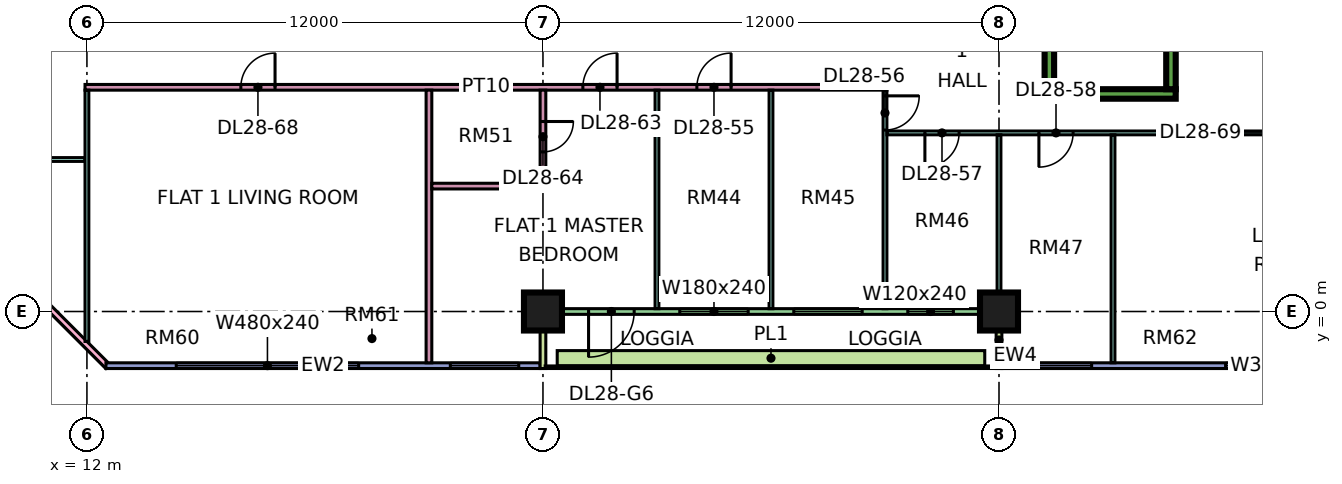
"""IFC4 building model, lengths in metres.
Left out: names, types, materials, properties, quantities, classifications, styles, units other than length and angle.
Written with IfcOpenShell. Run it as: python <this file> out.ifc"""

import sys

from ifc_helpers import new_model, si_unit, direction, frame, frame_2d, origin, origin_2d, place, context, subcontext, project, spatial, rectangle, extrude, element, fill, save


model = new_model("IFC4")
c1 = context("Model", 3, precision=1e-05, world=origin(), true_north=direction((0.0, 1.0)))
c2 = subcontext(c1, "Body", "Model", "MODEL_VIEW")
j1 = project(units=[si_unit("LENGTHUNIT", "METRE"), si_unit("PLANEANGLEUNIT", "RADIAN")], contexts=[c1])
p1 = place(None, origin())
s1 = spatial("IfcSite", under=j1, at=p1, CompositionType="ELEMENT")
p2 = place(p1, origin())
s2 = spatial("IfcBuilding", under=s1, at=p2, CompositionType="ELEMENT")
p3 = place(p2, frame((0.0, 0.0, 121.9)))
s3 = spatial("IfcBuildingStorey", under=s2, at=p3, CompositionType="ELEMENT", Elevation=121.9)
for number, where, z_axis, x_axis in (
    (1, (24.0, 0.0, 0.0), (0.0, 0.0, 1.0), (1.0, 0.0, 0.0)),
    (2, (36.0, 0.0, 0.0), (0.0, 0.0, 1.0), (1.0, 0.0, 0.0)),
):
    element("IfcColumn", number, at=place(p3, frame(where, z_axis=z_axis, x_axis=x_axis)), inside=s3, PredefinedType="COLUMN", context=c2, shape_type="SweptSolid", body=[
        extrude(rectangle(XDim=1.0, YDim=1.0, at=origin_2d()), origin(), (0.0, 0.0, 1.0), 3.75),
    ])
p4 = place(p3, frame((37.2, 5.725, 0.0), z_axis=(0.0, 0.0, 1.0), x_axis=(1.0, 0.0, 0.0)))
e3 = element("IfcWall", 3, at=p4, inside=s3, PredefinedType="SHEAR", context=c2, shape_type="SweptSolid", body=[
    extrude(rectangle(XDim=3.45, YDim=0.25, at=frame_2d((1.725, 0.0))), origin(), (0.0, 0.0, 1.0), 3.75),
])
for number, where, z_axis, x_axis in (
    (4, (37.325, 5.85, 0.0), (0.0, 0.0, 1.0), (0.0, 1.0, 0.0)),
    (5, (40.525, 5.85, 0.0), (0.0, 0.0, 1.0), (0.0, 1.0, 0.0)),
):
    element("IfcWall", number, at=place(p3, frame(where, z_axis=z_axis, x_axis=x_axis)), inside=s3, PredefinedType="SHEAR", context=c2, shape_type="SweptSolid", body=[
        extrude(rectangle(XDim=6.5, YDim=0.25, at=frame_2d((3.25, 0.0))), origin(), (0.0, 0.0, 1.0), 3.75),
    ])
p5 = place(p3, frame((-1.447, 12.553, 0.0), z_axis=(0.0, 0.0, 1.0), x_axis=(0.707106781187, -0.707106781187, 0.0)))
e6 = element("IfcWall", 6, at=p5, inside=s3, PredefinedType="SOLIDWALL", context=c2, shape_type="SweptSolid", body=[
    extrude(rectangle(XDim=19.799, YDim=0.15, at=frame_2d((9.899, 0.0))), origin(), (0.0, 0.0, 1.0), 3.35),
])
p6 = place(p5, frame((2.212, 0.0, 0.45)))
e7 = element("IfcOpeningElement", 7, at=p6, cuts=e6, PredefinedType="OPENING", context=c2, shape_type="SweptSolid", body=[
    extrude(rectangle(XDim=3.0, YDim=2.4, at=frame_2d((1.5, 1.2))), frame((0.0, 0.085, 0.0), z_axis=(0.0, -1.0, 0.0), x_axis=(1.0, 0.0, 0.0)), (0.0, 0.0, 1.0), 0.17),
])
p7 = place(p5, frame((10.216, 0.0, 0.45)))
e8 = element("IfcOpeningElement", 8, at=p7, cuts=e6, PredefinedType="OPENING", context=c2, shape_type="SweptSolid", body=[
    extrude(rectangle(XDim=3.0, YDim=2.4, at=frame_2d((1.5, 1.2))), frame((0.0, 0.085, 0.0), z_axis=(0.0, -1.0, 0.0), x_axis=(1.0, 0.0, 0.0)), (0.0, 0.0, 1.0), 0.17),
])
p8 = place(p3, frame((12.5, -1.425, 0.0), z_axis=(0.0, 0.0, 1.0), x_axis=(1.0, 0.0, 0.0)))
e9 = element("IfcWall", 9, at=p8, inside=s3, PredefinedType="SOLIDWALL", context=c2, shape_type="SweptSolid", body=[
    extrude(rectangle(XDim=11.425, YDim=0.15, at=frame_2d((5.712, 0.0))), origin(), (0.0, 0.0, 1.0), 3.35),
])
p9 = place(p8, frame((1.85, 0.0, 0.45)))
e10 = element("IfcOpeningElement", 10, at=p9, cuts=e9, PredefinedType="OPENING", context=c2, shape_type="SweptSolid", body=[
    extrude(rectangle(XDim=4.8, YDim=2.4, at=frame_2d((2.4, 1.2))), frame((0.0, 0.085, 0.0), z_axis=(0.0, -1.0, 0.0), x_axis=(1.0, 0.0, 0.0)), (0.0, 0.0, 1.0), 0.17),
])
p10 = place(p8, frame((9.062, 0.0, 0.45)))
e11 = element("IfcOpeningElement", 11, at=p10, cuts=e9, PredefinedType="OPENING", context=c2, shape_type="SweptSolid", body=[
    extrude(rectangle(XDim=1.8, YDim=2.4, at=frame_2d((0.9, 1.2))), frame((0.0, 0.085, 0.0), z_axis=(0.0, -1.0, 0.0), x_axis=(1.0, 0.0, 0.0)), (0.0, 0.0, 1.0), 0.17),
])
p11 = place(p3, frame((24.075, 0.0, 0.0), z_axis=(0.0, 0.0, 1.0), x_axis=(1.0, 0.0, 0.0)))
e12 = element("IfcWall", 12, at=p11, inside=s3, PredefinedType="SOLIDWALL", context=c2, shape_type="SweptSolid", body=[
    extrude(rectangle(XDim=11.85, YDim=0.15, at=frame_2d((5.925, 0.0))), origin(), (0.0, 0.0, 1.0), 3.35),
])
p12 = place(p11, frame((1.125, 0.0, 0.0)))
e13 = element("IfcOpeningElement", 13, at=p12, cuts=e12, PredefinedType="OPENING", context=c2, shape_type="SweptSolid", body=[
    extrude(rectangle(XDim=1.2, YDim=2.4, at=frame_2d((0.6, 1.2))), frame((0.0, 0.085, 0.0), z_axis=(0.0, -1.0, 0.0), x_axis=(1.0, 0.0, 0.0)), (0.0, 0.0, 1.0), 0.17),
])
p13 = place(p11, frame((3.525, 0.0, 0.45)))
e14 = element("IfcOpeningElement", 14, at=p13, cuts=e12, PredefinedType="OPENING", context=c2, shape_type="SweptSolid", body=[
    extrude(rectangle(XDim=1.8, YDim=2.4, at=frame_2d((0.9, 1.2))), frame((0.0, 0.085, 0.0), z_axis=(0.0, -1.0, 0.0), x_axis=(1.0, 0.0, 0.0)), (0.0, 0.0, 1.0), 0.17),
])
p14 = place(p11, frame((6.525, 0.0, 0.45)))
e15 = element("IfcOpeningElement", 15, at=p14, cuts=e12, PredefinedType="OPENING", context=c2, shape_type="SweptSolid", body=[
    extrude(rectangle(XDim=1.8, YDim=2.4, at=frame_2d((0.9, 1.2))), frame((0.0, 0.085, 0.0), z_axis=(0.0, -1.0, 0.0), x_axis=(1.0, 0.0, 0.0)), (0.0, 0.0, 1.0), 0.17),
])
p15 = place(p11, frame((9.525, 0.0, 0.45)))
e16 = element("IfcOpeningElement", 16, at=p15, cuts=e12, PredefinedType="OPENING", context=c2, shape_type="SweptSolid", body=[
    extrude(rectangle(XDim=1.2, YDim=2.4, at=frame_2d((0.6, 1.2))), frame((0.0, 0.085, 0.0), z_axis=(0.0, -1.0, 0.0), x_axis=(1.0, 0.0, 0.0)), (0.0, 0.0, 1.0), 0.17),
])
for number, where, z_axis, x_axis in (
    (17, (24.0, -1.5, 0.0), (0.0, 0.0, 1.0), (0.0, 1.0, 0.0)),
    (18, (36.0, -1.5, 0.0), (0.0, 0.0, 1.0), (0.0, 1.0, 0.0)),
):
    element("IfcWall", number, at=place(p3, frame(where, z_axis=z_axis, x_axis=x_axis)), inside=s3, PredefinedType="SOLIDWALL", context=c2, shape_type="SweptSolid", body=[
        extrude(rectangle(XDim=1.5, YDim=0.15, at=frame_2d((0.75, 0.0))), origin(), (0.0, 0.0, 1.0), 3.35),
    ])
p16 = place(p3, frame((36.075, -1.425, 0.0), z_axis=(0.0, 0.0, 1.0), x_axis=(1.0, 0.0, 0.0)))
e19 = element("IfcWall", 19, at=p16, inside=s3, PredefinedType="SOLIDWALL", context=c2, shape_type="SweptSolid", body=[
    extrude(rectangle(XDim=11.85, YDim=0.15, at=frame_2d((5.925, 0.0))), origin(), (0.0, 0.0, 1.0), 3.35),
])
p17 = place(p16, frame((0.562, 0.0, 0.45)))
e20 = element("IfcOpeningElement", 20, at=p17, cuts=e19, PredefinedType="OPENING", context=c2, shape_type="SweptSolid", body=[
    extrude(rectangle(XDim=1.8, YDim=2.4, at=frame_2d((0.9, 1.2))), frame((0.0, 0.085, 0.0), z_axis=(0.0, -1.0, 0.0), x_axis=(1.0, 0.0, 0.0)), (0.0, 0.0, 1.0), 0.17),
])
p18 = place(p16, frame((5.887, 0.0, 0.45)))
e21 = element("IfcOpeningElement", 21, at=p18, cuts=e19, PredefinedType="OPENING", context=c2, shape_type="SweptSolid", body=[
    extrude(rectangle(XDim=3.0, YDim=2.4, at=frame_2d((1.5, 1.2))), frame((0.0, 0.085, 0.0), z_axis=(0.0, -1.0, 0.0), x_axis=(1.0, 0.0, 0.0)), (0.0, 0.0, 1.0), 0.17),
])
p19 = place(p3, frame((24.375, -1.229, 0.0), z_axis=(0.0, 0.0, 1.0), x_axis=(1.0, 0.0, 0.0)))
e22 = element("IfcWall", 22, at=p19, inside=s3, PredefinedType="SOLIDWALL", context=c2, shape_type="SweptSolid", body=[
    extrude(rectangle(XDim=11.25, YDim=0.4, at=frame_2d((5.625, 0.0))), origin(), (0.0, 0.0, 1.0), 0.7),
])
p20 = place(p3, frame((9.05, 4.0, 0.0), z_axis=(0.0, 0.0, 1.0), x_axis=(1.0, 0.0, 0.0)))
e23 = element("IfcWall", 23, at=p20, inside=s3, PredefinedType="PARTITIONING", context=c2, shape_type="SweptSolid", body=[
    extrude(rectangle(XDim=2.9, YDim=0.1, at=frame_2d((1.45, 0.0))), origin(), (0.0, 0.0, 1.0), 3.35),
])
p21 = place(p3, frame((11.95, 5.9, 0.0), z_axis=(0.0, 0.0, 1.0), x_axis=(1.0, 0.0, 0.0)))
e24 = element("IfcWall", 24, at=p21, inside=s3, PredefinedType="PARTITIONING", context=c2, shape_type="SweptSolid", body=[
    extrude(rectangle(XDim=21.1, YDim=0.15, at=frame_2d((10.55, 0.0))), origin(), (0.0, 0.0, 1.0), 3.35),
])
p22 = place(p21, frame((16.1, 0.0, 0.0)))
e25 = element("IfcOpeningElement", 25, at=p22, cuts=e24, PredefinedType="OPENING", context=c2, shape_type="SweptSolid", body=[
    extrude(rectangle(XDim=0.9, YDim=2.1, at=frame_2d((0.45, 1.05))), frame((0.0, 0.085, 0.0), z_axis=(0.0, -1.0, 0.0), x_axis=(1.0, 0.0, 0.0)), (0.0, 0.0, 1.0), 0.17),
])
p23 = place(p21, frame((13.1, 0.0, 0.0)))
e26 = element("IfcOpeningElement", 26, at=p23, cuts=e24, PredefinedType="OPENING", context=c2, shape_type="SweptSolid", body=[
    extrude(rectangle(XDim=0.9, YDim=2.1, at=frame_2d((0.45, 1.05))), frame((0.0, 0.085, 0.0), z_axis=(0.0, -1.0, 0.0), x_axis=(1.0, 0.0, 0.0)), (0.0, 0.0, 1.0), 0.17),
])
p24 = place(p21, frame((4.1, 0.0, 0.0)))
e27 = element("IfcOpeningElement", 27, at=p24, cuts=e24, PredefinedType="OPENING", context=c2, shape_type="SweptSolid", body=[
    extrude(rectangle(XDim=0.9, YDim=2.1, at=frame_2d((0.45, 1.05))), frame((0.0, 0.085, 0.0), z_axis=(0.0, -1.0, 0.0), x_axis=(1.0, 0.0, 0.0)), (0.0, 0.0, 1.0), 0.17),
])
p25 = place(p3, frame((12.0, -0.788, 0.0), z_axis=(0.0, 0.0, 1.0), x_axis=(0.0, 1.0, 0.0)))
e28 = element("IfcWall", 28, at=p25, inside=s3, PredefinedType="PARTITIONING", context=c2, shape_type="SweptSolid", body=[
    extrude(rectangle(XDim=6.613, YDim=0.1, at=frame_2d((3.306, 0.0))), origin(), (0.0, 0.0, 1.0), 3.35),
])
p26 = place(p3, frame((21.0, -1.35, 0.0), z_axis=(0.0, 0.0, 1.0), x_axis=(0.0, 1.0, 0.0)))
e29 = element("IfcWall", 29, at=p26, inside=s3, PredefinedType="PARTITIONING", context=c2, shape_type="SweptSolid", body=[
    extrude(rectangle(XDim=7.175, YDim=0.15, at=frame_2d((3.587, 0.0))), origin(), (0.0, 0.0, 1.0), 3.35),
])
p27 = place(p3, frame((21.075, 3.3, 0.0), z_axis=(0.0, 0.0, 1.0), x_axis=(1.0, 0.0, 0.0)))
e30 = element("IfcWall", 30, at=p27, inside=s3, PredefinedType="PARTITIONING", context=c2, shape_type="SweptSolid", body=[
    extrude(rectangle(XDim=3.0, YDim=0.15, at=frame_2d((1.5, 0.0))), origin(), (0.0, 0.0, 1.0), 3.35),
])
p28 = place(p3, frame((24.0, 3.375, 0.0), z_axis=(0.0, 0.0, 1.0), x_axis=(0.0, 1.0, 0.0)))
e31 = element("IfcWall", 31, at=p28, inside=s3, PredefinedType="PARTITIONING", context=c2, shape_type="SweptSolid", body=[
    extrude(rectangle(XDim=2.45, YDim=0.15, at=frame_2d((1.225, 0.0))), origin(), (0.0, 0.0, 1.0), 3.35),
])
p29 = place(p28, frame((0.825, 0.0, 0.0)))
e32 = element("IfcOpeningElement", 32, at=p29, cuts=e31, PredefinedType="OPENING", context=c2, shape_type="SweptSolid", body=[
    extrude(rectangle(XDim=0.8, YDim=2.1, at=frame_2d((0.4, 1.05))), frame((0.0, 0.085, 0.0), z_axis=(0.0, -1.0, 0.0), x_axis=(1.0, 0.0, 0.0)), (0.0, 0.0, 1.0), 0.17),
])
for number, where, z_axis, x_axis in (
    (33, (27.0, 0.074, 0.0), (0.0, 0.0, 1.0), (0.0, 1.0, 0.0)),
    (34, (30.0, 0.074, 0.0), (0.0, 0.0, 1.0), (0.0, 1.0, 0.0)),
):
    element("IfcWall", number, at=place(p3, frame(where, z_axis=z_axis, x_axis=x_axis)), inside=s3, PredefinedType="PARTITIONING", context=c2, shape_type="SweptSolid", body=[
        extrude(rectangle(XDim=5.751, YDim=0.1, at=frame_2d((2.875, 0.0))), origin(), (0.0, 0.0, 1.0), 3.35),
    ])
p30 = place(p3, frame((33.0, 0.074, 0.0), z_axis=(0.0, 0.0, 1.0), x_axis=(0.0, 1.0, 0.0)))
e35 = element("IfcWall", 35, at=p30, inside=s3, PredefinedType="PARTITIONING", context=c2, shape_type="SweptSolid", body=[
    extrude(rectangle(XDim=5.751, YDim=0.1, at=frame_2d((2.875, 0.0))), origin(), (0.0, 0.0, 1.0), 3.35),
])
p31 = place(p30, frame((4.701, 0.0, 0.0)))
e36 = element("IfcOpeningElement", 36, at=p31, cuts=e35, PredefinedType="OPENING", context=c2, shape_type="SweptSolid", body=[
    extrude(rectangle(XDim=0.9, YDim=2.1, at=frame_2d((0.45, 1.05))), frame((0.0, 0.06, 0.0), z_axis=(0.0, -1.0, 0.0), x_axis=(1.0, 0.0, 0.0)), (0.0, 0.0, 1.0), 0.12),
])
p32 = place(p3, frame((33.05, 4.7, 0.0), z_axis=(0.0, 0.0, 1.0), x_axis=(1.0, 0.0, 0.0)))
e37 = element("IfcWall", 37, at=p32, inside=s3, PredefinedType="PARTITIONING", context=c2, shape_type="SweptSolid", body=[
    extrude(rectangle(XDim=20.85, YDim=0.1, at=frame_2d((10.425, 0.0))), origin(), (0.0, 0.0, 1.0), 3.35),
])
p33 = place(p32, frame((1.0, 0.0, 0.0)))
e38 = element("IfcOpeningElement", 38, at=p33, cuts=e37, PredefinedType="OPENING", context=c2, shape_type="SweptSolid", body=[
    extrude(rectangle(XDim=0.9, YDim=2.1, at=frame_2d((0.45, 1.05))), frame((0.0, 0.06, 0.0), z_axis=(0.0, -1.0, 0.0), x_axis=(1.0, 0.0, 0.0)), (0.0, 0.0, 1.0), 0.12),
])
p34 = place(p32, frame((4.0, 0.0, 0.0)))
e39 = element("IfcOpeningElement", 39, at=p34, cuts=e37, PredefinedType="OPENING", context=c2, shape_type="SweptSolid", body=[
    extrude(rectangle(XDim=0.9, YDim=2.1, at=frame_2d((0.45, 1.05))), frame((0.0, 0.06, 0.0), z_axis=(0.0, -1.0, 0.0), x_axis=(1.0, 0.0, 0.0)), (0.0, 0.0, 1.0), 0.12),
])
p35 = place(p32, frame((16.0, 0.0, 0.0)))
e40 = element("IfcOpeningElement", 40, at=p35, cuts=e37, PredefinedType="OPENING", context=c2, shape_type="SweptSolid", body=[
    extrude(rectangle(XDim=0.9, YDim=2.1, at=frame_2d((0.45, 1.05))), frame((0.0, 0.06, 0.0), z_axis=(0.0, -1.0, 0.0), x_axis=(1.0, 0.0, 0.0)), (0.0, 0.0, 1.0), 0.12),
])
p36 = place(p32, frame((19.0, 0.0, 0.0)))
e41 = element("IfcOpeningElement", 41, at=p36, cuts=e37, PredefinedType="OPENING", context=c2, shape_type="SweptSolid", body=[
    extrude(rectangle(XDim=0.9, YDim=2.1, at=frame_2d((0.45, 1.05))), frame((0.0, 0.06, 0.0), z_axis=(0.0, -1.0, 0.0), x_axis=(1.0, 0.0, 0.0)), (0.0, 0.0, 1.0), 0.12),
])
p37 = place(p32, frame((10.0, 0.0, 0.0)))
e42 = element("IfcOpeningElement", 42, at=p37, cuts=e37, PredefinedType="OPENING", context=c2, shape_type="SweptSolid", body=[
    extrude(rectangle(XDim=0.9, YDim=2.1, at=frame_2d((0.45, 1.05))), frame((0.0, 0.06, 0.0), z_axis=(0.0, -1.0, 0.0), x_axis=(1.0, 0.0, 0.0)), (0.0, 0.0, 1.0), 0.12),
])
p38 = place(p3, frame((36.0, 0.0, 0.0), z_axis=(0.0, 0.0, 1.0), x_axis=(0.0, 1.0, 0.0)))
e43 = element("IfcWall", 43, at=p38, inside=s3, PredefinedType="PARTITIONING", context=c2, shape_type="SweptSolid", body=[
    extrude(rectangle(XDim=4.65, YDim=0.1, at=frame_2d((2.325, 0.0))), origin(), (0.0, 0.0, 1.0), 3.35),
])
p39 = place(p3, frame((39.0, -1.35, 0.0), z_axis=(0.0, 0.0, 1.0), x_axis=(0.0, 1.0, 0.0)))
e44 = element("IfcWall", 44, at=p39, inside=s3, PredefinedType="PARTITIONING", context=c2, shape_type="SweptSolid", body=[
    extrude(rectangle(XDim=6.0, YDim=0.1, at=frame_2d((3.0, 0.0))), origin(), (0.0, 0.0, 1.0), 3.35),
])
p40 = place(p9, origin())
e45 = element("IfcWindow", 45, at=p40, inside=s3, PartitioningType="SINGLE_PANEL", PredefinedType="WINDOW", context=c2, shape_type="SweptSolid", body=[
    extrude(rectangle(XDim=4.8, YDim=2.4, at=frame_2d((2.4, 1.2))), frame((0.0, 0.03, 0.0), z_axis=(0.0, -1.0, 0.0), x_axis=(1.0, 0.0, 0.0)), (0.0, 0.0, 1.0), 0.06),
])
fill(e10, e45)
p41 = place(p10, origin())
e46 = element("IfcWindow", 46, at=p41, inside=s3, PartitioningType="SINGLE_PANEL", PredefinedType="WINDOW", context=c2, shape_type="SweptSolid", body=[
    extrude(rectangle(XDim=1.8, YDim=2.4, at=frame_2d((0.9, 1.2))), frame((0.0, 0.03, 0.0), z_axis=(0.0, -1.0, 0.0), x_axis=(1.0, 0.0, 0.0)), (0.0, 0.0, 1.0), 0.06),
])
fill(e11, e46)
p42 = place(p12, frame((1.2, 0.0, 0.0), z_axis=(0.0, 0.0, 1.0), x_axis=(-1.0, 0.0, 0.0)))
e47 = element("IfcDoor", 47, at=p42, inside=s3, OperationType="DOUBLE_DOOR_SINGLE_SWING", PredefinedType="DOOR", context=c2, shape_type="SweptSolid", body=[
    extrude(rectangle(XDim=1.2, YDim=2.4, at=frame_2d((0.6, 1.2))), frame((0.0, 0.025, 0.0), z_axis=(0.0, -1.0, 0.0), x_axis=(1.0, 0.0, 0.0)), (0.0, 0.0, 1.0), 0.05),
])
fill(e13, e47)
p43 = place(p13, origin())
e48 = element("IfcWindow", 48, at=p43, inside=s3, PartitioningType="SINGLE_PANEL", PredefinedType="WINDOW", context=c2, shape_type="SweptSolid", body=[
    extrude(rectangle(XDim=1.8, YDim=2.4, at=frame_2d((0.9, 1.2))), frame((0.0, 0.03, 0.0), z_axis=(0.0, -1.0, 0.0), x_axis=(1.0, 0.0, 0.0)), (0.0, 0.0, 1.0), 0.06),
])
fill(e14, e48)
p44 = place(p14, origin())
e49 = element("IfcWindow", 49, at=p44, inside=s3, PartitioningType="SINGLE_PANEL", PredefinedType="WINDOW", context=c2, shape_type="SweptSolid", body=[
    extrude(rectangle(XDim=1.8, YDim=2.4, at=frame_2d((0.9, 1.2))), frame((0.0, 0.03, 0.0), z_axis=(0.0, -1.0, 0.0), x_axis=(1.0, 0.0, 0.0)), (0.0, 0.0, 1.0), 0.06),
])
fill(e15, e49)
p45 = place(p15, origin())
e50 = element("IfcWindow", 50, at=p45, inside=s3, PartitioningType="SINGLE_PANEL", PredefinedType="WINDOW", context=c2, shape_type="SweptSolid", body=[
    extrude(rectangle(XDim=1.2, YDim=2.4, at=frame_2d((0.6, 1.2))), frame((0.0, 0.03, 0.0), z_axis=(0.0, -1.0, 0.0), x_axis=(1.0, 0.0, 0.0)), (0.0, 0.0, 1.0), 0.06),
])
fill(e16, e50)
p46 = place(p17, origin())
e51 = element("IfcWindow", 51, at=p46, inside=s3, PartitioningType="SINGLE_PANEL", PredefinedType="WINDOW", context=c2, shape_type="SweptSolid", body=[
    extrude(rectangle(XDim=1.8, YDim=2.4, at=frame_2d((0.9, 1.2))), frame((0.0, 0.03, 0.0), z_axis=(0.0, -1.0, 0.0), x_axis=(1.0, 0.0, 0.0)), (0.0, 0.0, 1.0), 0.06),
])
fill(e20, e51)
p47 = place(p18, origin())
e52 = element("IfcWindow", 52, at=p47, inside=s3, PartitioningType="SINGLE_PANEL", PredefinedType="WINDOW", context=c2, shape_type="SweptSolid", body=[
    extrude(rectangle(XDim=3.0, YDim=2.4, at=frame_2d((1.5, 1.2))), frame((0.0, 0.03, 0.0), z_axis=(0.0, -1.0, 0.0), x_axis=(1.0, 0.0, 0.0)), (0.0, 0.0, 1.0), 0.06),
])
fill(e21, e52)
p48 = place(p22, frame((0.9, 0.0, 0.0), z_axis=(0.0, 0.0, 1.0), x_axis=(-1.0, 0.0, 0.0)))
e53 = element("IfcDoor", 53, at=p48, inside=s3, OperationType="SINGLE_SWING_RIGHT", PredefinedType="DOOR", context=c2, shape_type="SweptSolid", body=[
    extrude(rectangle(XDim=0.9, YDim=2.1, at=frame_2d((0.45, 1.05))), frame((0.0, 0.025, 0.0), z_axis=(0.0, -1.0, 0.0), x_axis=(1.0, 0.0, 0.0)), (0.0, 0.0, 1.0), 0.05),
])
fill(e25, e53)
p49 = place(p31, origin())
e54 = element("IfcDoor", 54, at=p49, inside=s3, OperationType="SINGLE_SWING_RIGHT", PredefinedType="DOOR", context=c2, shape_type="SweptSolid", body=[
    extrude(rectangle(XDim=0.9, YDim=2.1, at=frame_2d((0.45, 1.05))), frame((0.0, 0.025, 0.0), z_axis=(0.0, -1.0, 0.0), x_axis=(1.0, 0.0, 0.0)), (0.0, 0.0, 1.0), 0.05),
])
fill(e36, e54)
p50 = place(p33, frame((0.9, 0.0, 0.0), z_axis=(0.0, 0.0, 1.0), x_axis=(-1.0, 0.0, 0.0)))
e55 = element("IfcDoor", 55, at=p50, inside=s3, OperationType="SINGLE_SWING_LEFT", PredefinedType="DOOR", context=c2, shape_type="SweptSolid", body=[
    extrude(rectangle(XDim=0.9, YDim=2.1, at=frame_2d((0.45, 1.05))), frame((0.0, 0.025, 0.0), z_axis=(0.0, -1.0, 0.0), x_axis=(1.0, 0.0, 0.0)), (0.0, 0.0, 1.0), 0.05),
])
fill(e38, e55)
p51 = place(p34, frame((0.9, 0.0, 0.0), z_axis=(0.0, 0.0, 1.0), x_axis=(-1.0, 0.0, 0.0)))
e56 = element("IfcDoor", 56, at=p51, inside=s3, OperationType="SINGLE_SWING_LEFT", PredefinedType="DOOR", context=c2, shape_type="SweptSolid", body=[
    extrude(rectangle(XDim=0.9, YDim=2.1, at=frame_2d((0.45, 1.05))), frame((0.0, 0.025, 0.0), z_axis=(0.0, -1.0, 0.0), x_axis=(1.0, 0.0, 0.0)), (0.0, 0.0, 1.0), 0.05),
])
fill(e39, e56)
p52 = place(p23, frame((0.9, 0.0, 0.0), z_axis=(0.0, 0.0, 1.0), x_axis=(-1.0, 0.0, 0.0)))
e57 = element("IfcDoor", 57, at=p52, inside=s3, OperationType="SINGLE_SWING_RIGHT", PredefinedType="DOOR", context=c2, shape_type="SweptSolid", body=[
    extrude(rectangle(XDim=0.9, YDim=2.1, at=frame_2d((0.45, 1.05))), frame((0.0, 0.025, 0.0), z_axis=(0.0, -1.0, 0.0), x_axis=(1.0, 0.0, 0.0)), (0.0, 0.0, 1.0), 0.05),
])
fill(e26, e57)
p53 = place(p29, origin())
e58 = element("IfcDoor", 58, at=p53, inside=s3, OperationType="SINGLE_SWING_RIGHT", PredefinedType="DOOR", context=c2, shape_type="SweptSolid", body=[
    extrude(rectangle(XDim=0.8, YDim=2.1, at=frame_2d((0.4, 1.05))), frame((0.0, 0.025, 0.0), z_axis=(0.0, -1.0, 0.0), x_axis=(1.0, 0.0, 0.0)), (0.0, 0.0, 1.0), 0.05),
])
fill(e32, e58)
p54 = place(p24, frame((0.9, 0.0, 0.0), z_axis=(0.0, 0.0, 1.0), x_axis=(-1.0, 0.0, 0.0)))
e59 = element("IfcDoor", 59, at=p54, inside=s3, OperationType="SINGLE_SWING_RIGHT", PredefinedType="DOOR", context=c2, shape_type="SweptSolid", body=[
    extrude(rectangle(XDim=0.9, YDim=2.1, at=frame_2d((0.45, 1.05))), frame((0.0, 0.025, 0.0), z_axis=(0.0, -1.0, 0.0), x_axis=(1.0, 0.0, 0.0)), (0.0, 0.0, 1.0), 0.05),
])
fill(e27, e59)
save(model, sys.argv[1])
